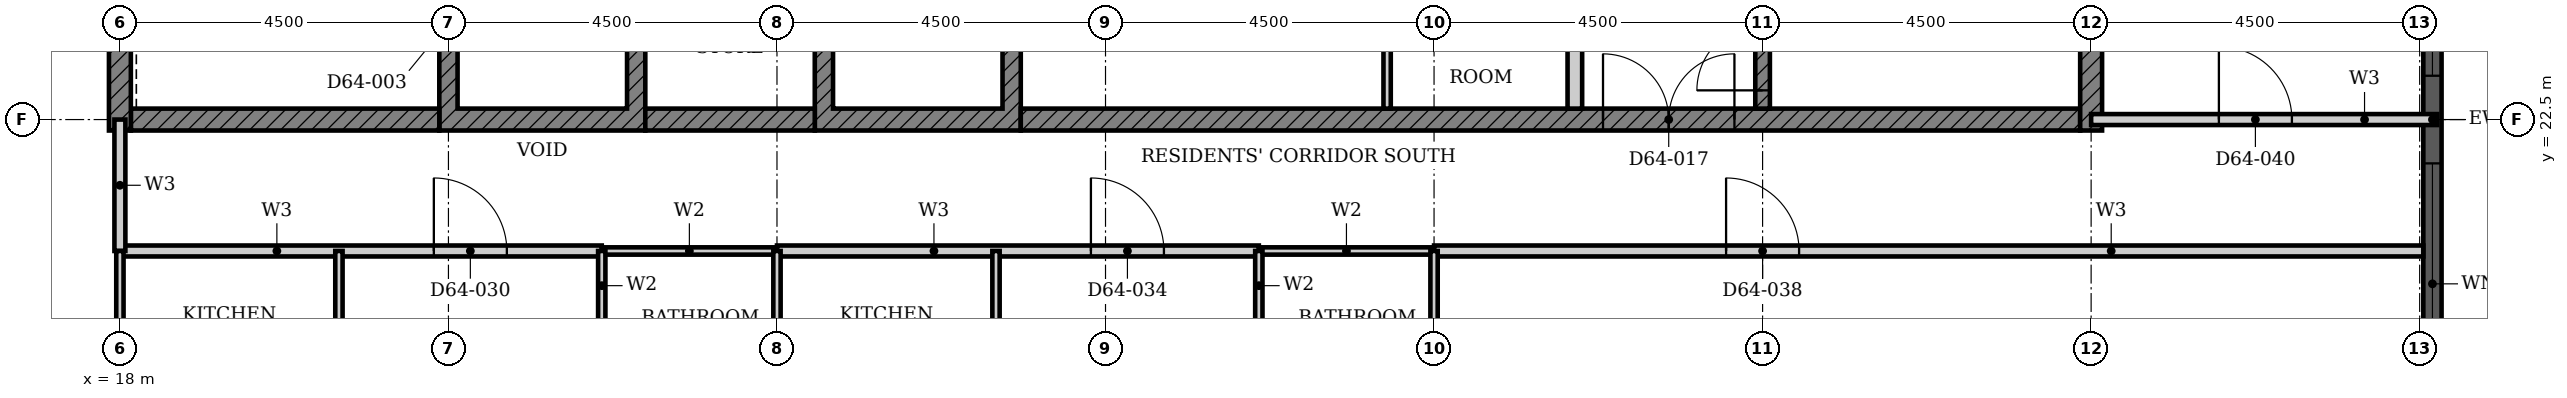
"""IFC4 building model, lengths in metres.
Left out: names, types, materials, properties, quantities, classifications, styles, units other than length and angle.
Written with IfcOpenShell. Run it as: python <this file> out.ifc"""

import sys

from ifc_helpers import new_model, si_unit, direction, frame, frame_2d, origin, place, context, subcontext, project, spatial, polyline, rectangle, outline, extrude, element, fill, save


model = new_model("IFC4")
c1 = context("Model", 3, precision=1e-05, world=origin(), true_north=direction((0.0, 1.0)))
c2 = subcontext(c1, "Body", "Model", "MODEL_VIEW")
j1 = project(units=[si_unit("LENGTHUNIT", "METRE"), si_unit("PLANEANGLEUNIT", "RADIAN")], contexts=[c1])
p1 = place(None, origin())
s1 = spatial("IfcSite", under=j1, at=p1, CompositionType="ELEMENT")
p2 = place(p1, origin())
s2 = spatial("IfcBuilding", under=s1, at=p2, CompositionType="ELEMENT")
p3 = place(p2, frame((0.0, 0.0, 252.7)))
s3 = spatial("IfcBuildingStorey", under=s2, at=p3, CompositionType="ELEMENT", Elevation=252.7)
p4 = place(p3, frame((49.675, 18.3, 0.0), z_axis=(0.0, 0.0, 1.0), x_axis=(0.0, 1.0, 0.0)))
e1 = element("IfcWall", 1, at=p4, inside=s3, PredefinedType="SOLIDWALL", context=c2, shape_type="SweptSolid", body=[
    extrude(rectangle(XDim=8.4, YDim=0.25, at=frame_2d((4.2, 0.0))), origin(), (0.0, 0.0, 1.0), 3.7),
])
p5 = place(p4, frame((0.3, 0.0, 0.45)))
e2 = element("IfcOpeningElement", 2, at=p5, cuts=e1, PredefinedType="OPENING", context=c2, shape_type="SweptSolid", body=[
    extrude(rectangle(XDim=3.3, YDim=2.3, at=frame_2d((1.65, 1.15))), frame((0.0, 0.135, 0.0), z_axis=(0.0, -1.0, 0.0), x_axis=(1.0, 0.0, 0.0)), (0.0, 0.0, 1.0), 0.27),
])
p6 = place(p4, frame((4.8, 0.0, 0.45)))
e3 = element("IfcOpeningElement", 3, at=p6, cuts=e1, PredefinedType="OPENING", context=c2, shape_type="SweptSolid", body=[
    extrude(rectangle(XDim=3.3, YDim=2.3, at=frame_2d((1.65, 1.15))), frame((0.0, 0.135, 0.0), z_axis=(0.0, -1.0, 0.0), x_axis=(1.0, 0.0, 0.0)), (0.0, 0.0, 1.0), 0.27),
])
p7 = place(p3, origin())
e4 = element("IfcWall", 4, at=p7, inside=s3, PredefinedType="SHEAR", context=c2, shape_type="SweptSolid", body=[
    extrude(outline(polyline([(22.375, 22.35), (25.197, 22.35), (25.197, 25.275), (24.947, 25.275), (24.947, 22.65), (22.625, 22.65), (22.625, 25.275), (22.375, 25.275), (22.375, 22.35)])), origin(), (0.0, 0.0, 1.0), 3.4),
])
p8 = place(p3, origin())
e5 = element("IfcWall", 5, at=p8, inside=s3, PredefinedType="SHEAR", context=c2, shape_type="SweptSolid", body=[
    extrude(outline(polyline([(27.518, 22.35), (30.339, 22.35), (30.339, 25.275), (30.089, 25.275), (30.089, 22.65), (27.768, 22.65), (27.768, 25.275), (27.518, 25.275), (27.518, 22.35)])), origin(), (0.0, 0.0, 1.0), 3.4),
])
p9 = place(p3, frame((18.15, 22.5, 0.0), z_axis=(0.0, 0.0, 1.0), x_axis=(1.0, 0.0, 0.0)))
e6 = element("IfcWall", 6, at=p9, inside=s3, PredefinedType="SHEAR", context=c2, shape_type="SweptSolid", body=[
    extrude(rectangle(XDim=4.225, YDim=0.3, at=frame_2d((2.113, 0.0))), origin(), (0.0, 0.0, 1.0), 3.4),
])
p10 = place(p3, frame((25.197, 22.5, 0.0), z_axis=(0.0, 0.0, 1.0), x_axis=(1.0, 0.0, 0.0)))
e7 = element("IfcWall", 7, at=p10, inside=s3, PredefinedType="SHEAR", context=c2, shape_type="SweptSolid", body=[
    extrude(rectangle(XDim=2.321, YDim=0.3, at=frame_2d((1.161, 0.0))), origin(), (0.0, 0.0, 1.0), 3.4),
])
p11 = place(p3, frame((30.339, 22.5, 0.0), z_axis=(0.0, 0.0, 1.0), x_axis=(1.0, 0.0, 0.0)))
e8 = element("IfcWall", 8, at=p11, inside=s3, PredefinedType="SHEAR", context=c2, shape_type="SweptSolid", body=[
    extrude(rectangle(XDim=14.511, YDim=0.3, at=frame_2d((7.255, 0.0))), origin(), (0.0, 0.0, 1.0), 3.4),
])
p12 = place(p11, frame((7.975, 0.0, 0.0)))
e9 = element("IfcOpeningElement", 9, at=p12, cuts=e8, PredefinedType="OPENING", context=c2, shape_type="SweptSolid", body=[
    extrude(rectangle(XDim=1.8, YDim=2.1, at=frame_2d((0.9, 1.05))), frame((0.0, 0.16, 0.0), z_axis=(0.0, -1.0, 0.0), x_axis=(1.0, 0.0, 0.0)), (0.0, 0.0, 1.0), 0.32),
])
for number, where, z_axis, x_axis in (
    (10, (18.0, 22.35, 0.0), (0.0, 0.0, 1.0), (0.0, 1.0, 0.0)),
    (11, (45.0, 22.35, 0.0), (0.0, 0.0, 1.0), (0.0, 1.0, 0.0)),
):
    element("IfcWall", number, at=place(p3, frame(where, z_axis=z_axis, x_axis=x_axis)), inside=s3, PredefinedType="SHEAR", context=c2, shape_type="SweptSolid", body=[
        extrude(rectangle(XDim=9.3, YDim=0.3, at=frame_2d((4.65, 0.0))), origin(), (0.0, 0.0, 1.0), 3.4),
    ])
p13 = place(p3, frame((37.928, 22.65, 0.0), z_axis=(0.0, 0.0, 1.0), x_axis=(0.0, 1.0, 0.0)))
e12 = element("IfcWall", 12, at=p13, inside=s3, PredefinedType="PARTITIONING", context=c2, shape_type="SweptSolid", body=[
    extrude(rectangle(XDim=2.625, YDim=0.2, at=frame_2d((1.312, 0.0))), origin(), (0.0, 0.0, 1.0), 3.4),
])
p14 = place(p3, frame((35.357, 22.65, 0.0), z_axis=(0.0, 0.0, 1.0), x_axis=(0.0, 1.0, 0.0)))
e13 = element("IfcWall", 13, at=p14, inside=s3, PredefinedType="PARTITIONING", context=c2, shape_type="SweptSolid", body=[
    extrude(rectangle(XDim=2.625, YDim=0.1, at=frame_2d((1.312, 0.0))), origin(), (0.0, 0.0, 1.0), 3.4),
])
p15 = place(p3, frame((40.5, 22.65, 0.0), z_axis=(0.0, 0.0, 1.0), x_axis=(0.0, 1.0, 0.0)))
e14 = element("IfcWall", 14, at=p15, inside=s3, PredefinedType="SHEAR", context=c2, shape_type="SweptSolid", body=[
    extrude(rectangle(XDim=5.825, YDim=0.2, at=frame_2d((2.913, 0.0))), origin(), (0.0, 0.0, 1.0), 3.4),
])
p16 = place(p15, frame((0.25, 0.0, 0.0)))
e15 = element("IfcOpeningElement", 15, at=p16, cuts=e14, PredefinedType="OPENING", context=c2, shape_type="SweptSolid", body=[
    extrude(rectangle(XDim=1.8, YDim=2.1, at=frame_2d((0.9, 1.05))), frame((0.0, 0.11, 0.0), z_axis=(0.0, -1.0, 0.0), x_axis=(1.0, 0.0, 0.0)), (0.0, 0.0, 1.0), 0.22),
])
p17 = place(p3, frame((18.0, 20.7, 0.0), z_axis=(0.0, 0.0, 1.0), x_axis=(1.0, 0.0, 0.0)))
e16 = element("IfcWall", 16, at=p17, inside=s3, PredefinedType="PARTITIONING", context=c2, shape_type="SweptSolid", body=[
    extrude(rectangle(XDim=6.6, YDim=0.15, at=frame_2d((3.3, 0.0))), origin(), (0.0, 0.0, 1.0), 3.4),
])
p18 = place(p17, frame((4.3, 0.0, 0.0)))
e17 = element("IfcOpeningElement", 17, at=p18, cuts=e16, PredefinedType="OPENING", context=c2, shape_type="SweptSolid", body=[
    extrude(rectangle(XDim=1.0, YDim=2.2, at=frame_2d((0.5, 1.1))), frame((0.0, 0.085, 0.0), z_axis=(0.0, -1.0, 0.0), x_axis=(1.0, 0.0, 0.0)), (0.0, 0.0, 1.0), 0.17),
])
p19 = place(p3, frame((27.0, 20.7, 0.0), z_axis=(0.0, 0.0, 1.0), x_axis=(1.0, 0.0, 0.0)))
e18 = element("IfcWall", 18, at=p19, inside=s3, PredefinedType="PARTITIONING", context=c2, shape_type="SweptSolid", body=[
    extrude(rectangle(XDim=6.6, YDim=0.15, at=frame_2d((3.3, 0.0))), origin(), (0.0, 0.0, 1.0), 3.4),
])
p20 = place(p19, frame((4.3, 0.0, 0.0)))
e19 = element("IfcOpeningElement", 19, at=p20, cuts=e18, PredefinedType="OPENING", context=c2, shape_type="SweptSolid", body=[
    extrude(rectangle(XDim=1.0, YDim=2.2, at=frame_2d((0.5, 1.1))), frame((0.0, 0.085, 0.0), z_axis=(0.0, -1.0, 0.0), x_axis=(1.0, 0.0, 0.0)), (0.0, 0.0, 1.0), 0.17),
])
p21 = place(p3, frame((36.0, 20.7, 0.0), z_axis=(0.0, 0.0, 1.0), x_axis=(1.0, 0.0, 0.0)))
e20 = element("IfcWall", 20, at=p21, inside=s3, PredefinedType="PARTITIONING", context=c2, shape_type="SweptSolid", body=[
    extrude(rectangle(XDim=13.55, YDim=0.15, at=frame_2d((6.775, 0.0))), origin(), (0.0, 0.0, 1.0), 3.4),
])
p22 = place(p21, frame((4.0, 0.0, 0.0)))
e21 = element("IfcOpeningElement", 21, at=p22, cuts=e20, PredefinedType="OPENING", context=c2, shape_type="SweptSolid", body=[
    extrude(rectangle(XDim=1.0, YDim=2.1, at=frame_2d((0.5, 1.05))), frame((0.0, 0.085, 0.0), z_axis=(0.0, -1.0, 0.0), x_axis=(1.0, 0.0, 0.0)), (0.0, 0.0, 1.0), 0.17),
])
p23 = place(p3, frame((45.0, 22.5, 0.0), z_axis=(0.0, 0.0, 1.0), x_axis=(1.0, 0.0, 0.0)))
e22 = element("IfcWall", 22, at=p23, inside=s3, PredefinedType="PARTITIONING", context=c2, shape_type="SweptSolid", body=[
    extrude(rectangle(XDim=4.74, YDim=0.15, at=frame_2d((2.37, 0.0))), origin(), (0.0, 0.0, 1.0), 3.4),
])
p24 = place(p23, frame((1.75, 0.0, 0.0)))
e23 = element("IfcOpeningElement", 23, at=p24, cuts=e22, PredefinedType="OPENING", context=c2, shape_type="SweptSolid", body=[
    extrude(rectangle(XDim=1.0, YDim=2.1, at=frame_2d((0.5, 1.05))), frame((0.0, 0.085, 0.0), z_axis=(0.0, -1.0, 0.0), x_axis=(1.0, 0.0, 0.0)), (0.0, 0.0, 1.0), 0.17),
])
p25 = place(p3, frame((18.0, 20.7, 0.0), z_axis=(0.0, 0.0, 1.0), x_axis=(0.0, 1.0, 0.0)))
e24 = element("IfcWall", 24, at=p25, inside=s3, PredefinedType="PARTITIONING", context=c2, shape_type="SweptSolid", body=[
    extrude(rectangle(XDim=1.8, YDim=0.15, at=frame_2d((0.9, 0.0))), origin(), (0.0, 0.0, 1.0), 3.4),
])
for number, where, z_axis, x_axis in (
    (25, (18.0, 18.0, 0.0), (0.0, 0.0, 1.0), (0.0, 1.0, 0.0)),
    (26, (21.0, 18.0, 0.0), (0.0, 0.0, 1.0), (0.0, 1.0, 0.0)),
    (27, (30.0, 18.0, 0.0), (0.0, 0.0, 1.0), (0.0, 1.0, 0.0)),
):
    element("IfcWall", number, at=place(p3, frame(where, z_axis=z_axis, x_axis=x_axis)), inside=s3, PredefinedType="PARTITIONING", context=c2, shape_type="SweptSolid", body=[
        extrude(rectangle(XDim=2.7, YDim=0.1, at=frame_2d((1.35, 0.0))), origin(), (0.0, 0.0, 1.0), 3.4),
    ])
for number, where, z_axis, x_axis in (
    (28, (24.6, 20.7, 0.0), (0.0, 0.0, 1.0), (1.0, 0.0, 0.0)),
    (29, (33.6, 20.7, 0.0), (0.0, 0.0, 1.0), (1.0, 0.0, 0.0)),
):
    element("IfcWall", number, at=place(p3, frame(where, z_axis=z_axis, x_axis=x_axis)), inside=s3, PredefinedType="PARTITIONING", context=c2, shape_type="SweptSolid", body=[
        extrude(rectangle(XDim=2.4, YDim=0.1, at=frame_2d((1.2, 0.0))), origin(), (0.0, 0.0, 1.0), 3.4),
    ])
p26 = place(p3, frame((24.6, 18.0, 0.0), z_axis=(0.0, 0.0, 1.0), x_axis=(0.0, 1.0, 0.0)))
e30 = element("IfcWall", 30, at=p26, inside=s3, PredefinedType="PARTITIONING", context=c2, shape_type="SweptSolid", body=[
    extrude(rectangle(XDim=2.7, YDim=0.1, at=frame_2d((1.35, 0.0))), origin(), (0.0, 0.0, 1.0), 3.4),
])
p27 = place(p26, frame((0.95, 0.0, 0.0)))
e31 = element("IfcOpeningElement", 31, at=p27, cuts=e30, PredefinedType="OPENING", context=c2, shape_type="SweptSolid", body=[
    extrude(rectangle(XDim=0.8, YDim=2.1, at=frame_2d((0.4, 1.05))), frame((0.0, 0.06, 0.0), z_axis=(0.0, -1.0, 0.0), x_axis=(1.0, 0.0, 0.0)), (0.0, 0.0, 1.0), 0.12),
])
p28 = place(p3, frame((27.0, 18.0, 0.0), z_axis=(0.0, 0.0, 1.0), x_axis=(0.0, 1.0, 0.0)))
e32 = element("IfcWall", 32, at=p28, inside=s3, PredefinedType="PARTITIONING", context=c2, shape_type="SweptSolid", body=[
    extrude(rectangle(XDim=2.7, YDim=0.1, at=frame_2d((1.35, 0.0))), origin(), (0.0, 0.0, 1.0), 3.4),
])
p29 = place(p3, frame((33.6, 18.0, 0.0), z_axis=(0.0, 0.0, 1.0), x_axis=(0.0, 1.0, 0.0)))
e33 = element("IfcWall", 33, at=p29, inside=s3, PredefinedType="PARTITIONING", context=c2, shape_type="SweptSolid", body=[
    extrude(rectangle(XDim=2.7, YDim=0.1, at=frame_2d((1.35, 0.0))), origin(), (0.0, 0.0, 1.0), 3.4),
])
p30 = place(p29, frame((0.95, 0.0, 0.0)))
e34 = element("IfcOpeningElement", 34, at=p30, cuts=e33, PredefinedType="OPENING", context=c2, shape_type="SweptSolid", body=[
    extrude(rectangle(XDim=0.8, YDim=2.1, at=frame_2d((0.4, 1.05))), frame((0.0, 0.06, 0.0), z_axis=(0.0, -1.0, 0.0), x_axis=(1.0, 0.0, 0.0)), (0.0, 0.0, 1.0), 0.12),
])
p31 = place(p3, frame((36.0, 18.0, 0.0), z_axis=(0.0, 0.0, 1.0), x_axis=(0.0, 1.0, 0.0)))
e35 = element("IfcWall", 35, at=p31, inside=s3, PredefinedType="PARTITIONING", context=c2, shape_type="SweptSolid", body=[
    extrude(rectangle(XDim=2.7, YDim=0.1, at=frame_2d((1.35, 0.0))), origin(), (0.0, 0.0, 1.0), 3.4),
])
p32 = place(p5, origin())
e36 = element("IfcWindow", 36, at=p32, inside=s3, PartitioningType="SINGLE_PANEL", PredefinedType="WINDOW", context=c2, shape_type="SweptSolid", body=[
    extrude(rectangle(XDim=3.3, YDim=2.3, at=frame_2d((1.65, 1.15))), frame((0.0, 0.03, 0.0), z_axis=(0.0, -1.0, 0.0), x_axis=(1.0, 0.0, 0.0)), (0.0, 0.0, 1.0), 0.06),
])
fill(e2, e36)
p33 = place(p6, origin())
e37 = element("IfcWindow", 37, at=p33, inside=s3, PartitioningType="SINGLE_PANEL", PredefinedType="WINDOW", context=c2, shape_type="SweptSolid", body=[
    extrude(rectangle(XDim=3.3, YDim=2.3, at=frame_2d((1.65, 1.15))), frame((0.0, 0.03, 0.0), z_axis=(0.0, -1.0, 0.0), x_axis=(1.0, 0.0, 0.0)), (0.0, 0.0, 1.0), 0.06),
])
fill(e3, e37)
p34 = place(p16, origin())
e38 = element("IfcDoor", 38, at=p34, inside=s3, OperationType="DOUBLE_DOOR_SINGLE_SWING", PredefinedType="DOOR", context=c2, shape_type="SweptSolid", body=[
    extrude(rectangle(XDim=1.8, YDim=2.1, at=frame_2d((0.9, 1.05))), frame((0.0, 0.025, 0.0), z_axis=(0.0, -1.0, 0.0), x_axis=(1.0, 0.0, 0.0)), (0.0, 0.0, 1.0), 0.05),
])
fill(e15, e38)
p35 = place(p12, origin())
e39 = element("IfcDoor", 39, at=p35, inside=s3, OperationType="DOUBLE_DOOR_SINGLE_SWING", PredefinedType="DOOR", context=c2, shape_type="SweptSolid", body=[
    extrude(rectangle(XDim=1.8, YDim=2.1, at=frame_2d((0.9, 1.05))), frame((0.0, 0.025, 0.0), z_axis=(0.0, -1.0, 0.0), x_axis=(1.0, 0.0, 0.0)), (0.0, 0.0, 1.0), 0.05),
])
fill(e9, e39)
p36 = place(p18, origin())
e40 = element("IfcDoor", 40, at=p36, inside=s3, OperationType="SINGLE_SWING_RIGHT", PredefinedType="DOOR", context=c2, shape_type="SweptSolid", body=[
    extrude(rectangle(XDim=1.0, YDim=2.2, at=frame_2d((0.5, 1.1))), frame((0.0, 0.025, 0.0), z_axis=(0.0, -1.0, 0.0), x_axis=(1.0, 0.0, 0.0)), (0.0, 0.0, 1.0), 0.05),
])
fill(e17, e40)
p37 = place(p20, origin())
e41 = element("IfcDoor", 41, at=p37, inside=s3, OperationType="SINGLE_SWING_RIGHT", PredefinedType="DOOR", context=c2, shape_type="SweptSolid", body=[
    extrude(rectangle(XDim=1.0, YDim=2.2, at=frame_2d((0.5, 1.1))), frame((0.0, 0.025, 0.0), z_axis=(0.0, -1.0, 0.0), x_axis=(1.0, 0.0, 0.0)), (0.0, 0.0, 1.0), 0.05),
])
fill(e19, e41)
p38 = place(p22, origin())
e42 = element("IfcDoor", 42, at=p38, inside=s3, OperationType="SINGLE_SWING_LEFT", PredefinedType="DOOR", context=c2, shape_type="SweptSolid", body=[
    extrude(rectangle(XDim=1.0, YDim=2.1, at=frame_2d((0.5, 1.05))), frame((0.0, 0.025, 0.0), z_axis=(0.0, -1.0, 0.0), x_axis=(1.0, 0.0, 0.0)), (0.0, 0.0, 1.0), 0.05),
])
fill(e21, e42)
p39 = place(p24, origin())
e43 = element("IfcDoor", 43, at=p39, inside=s3, OperationType="SINGLE_SWING_RIGHT", PredefinedType="DOOR", context=c2, shape_type="SweptSolid", body=[
    extrude(rectangle(XDim=1.0, YDim=2.1, at=frame_2d((0.5, 1.05))), frame((0.0, 0.025, 0.0), z_axis=(0.0, -1.0, 0.0), x_axis=(1.0, 0.0, 0.0)), (0.0, 0.0, 1.0), 0.05),
])
fill(e23, e43)
save(model, sys.argv[1])
